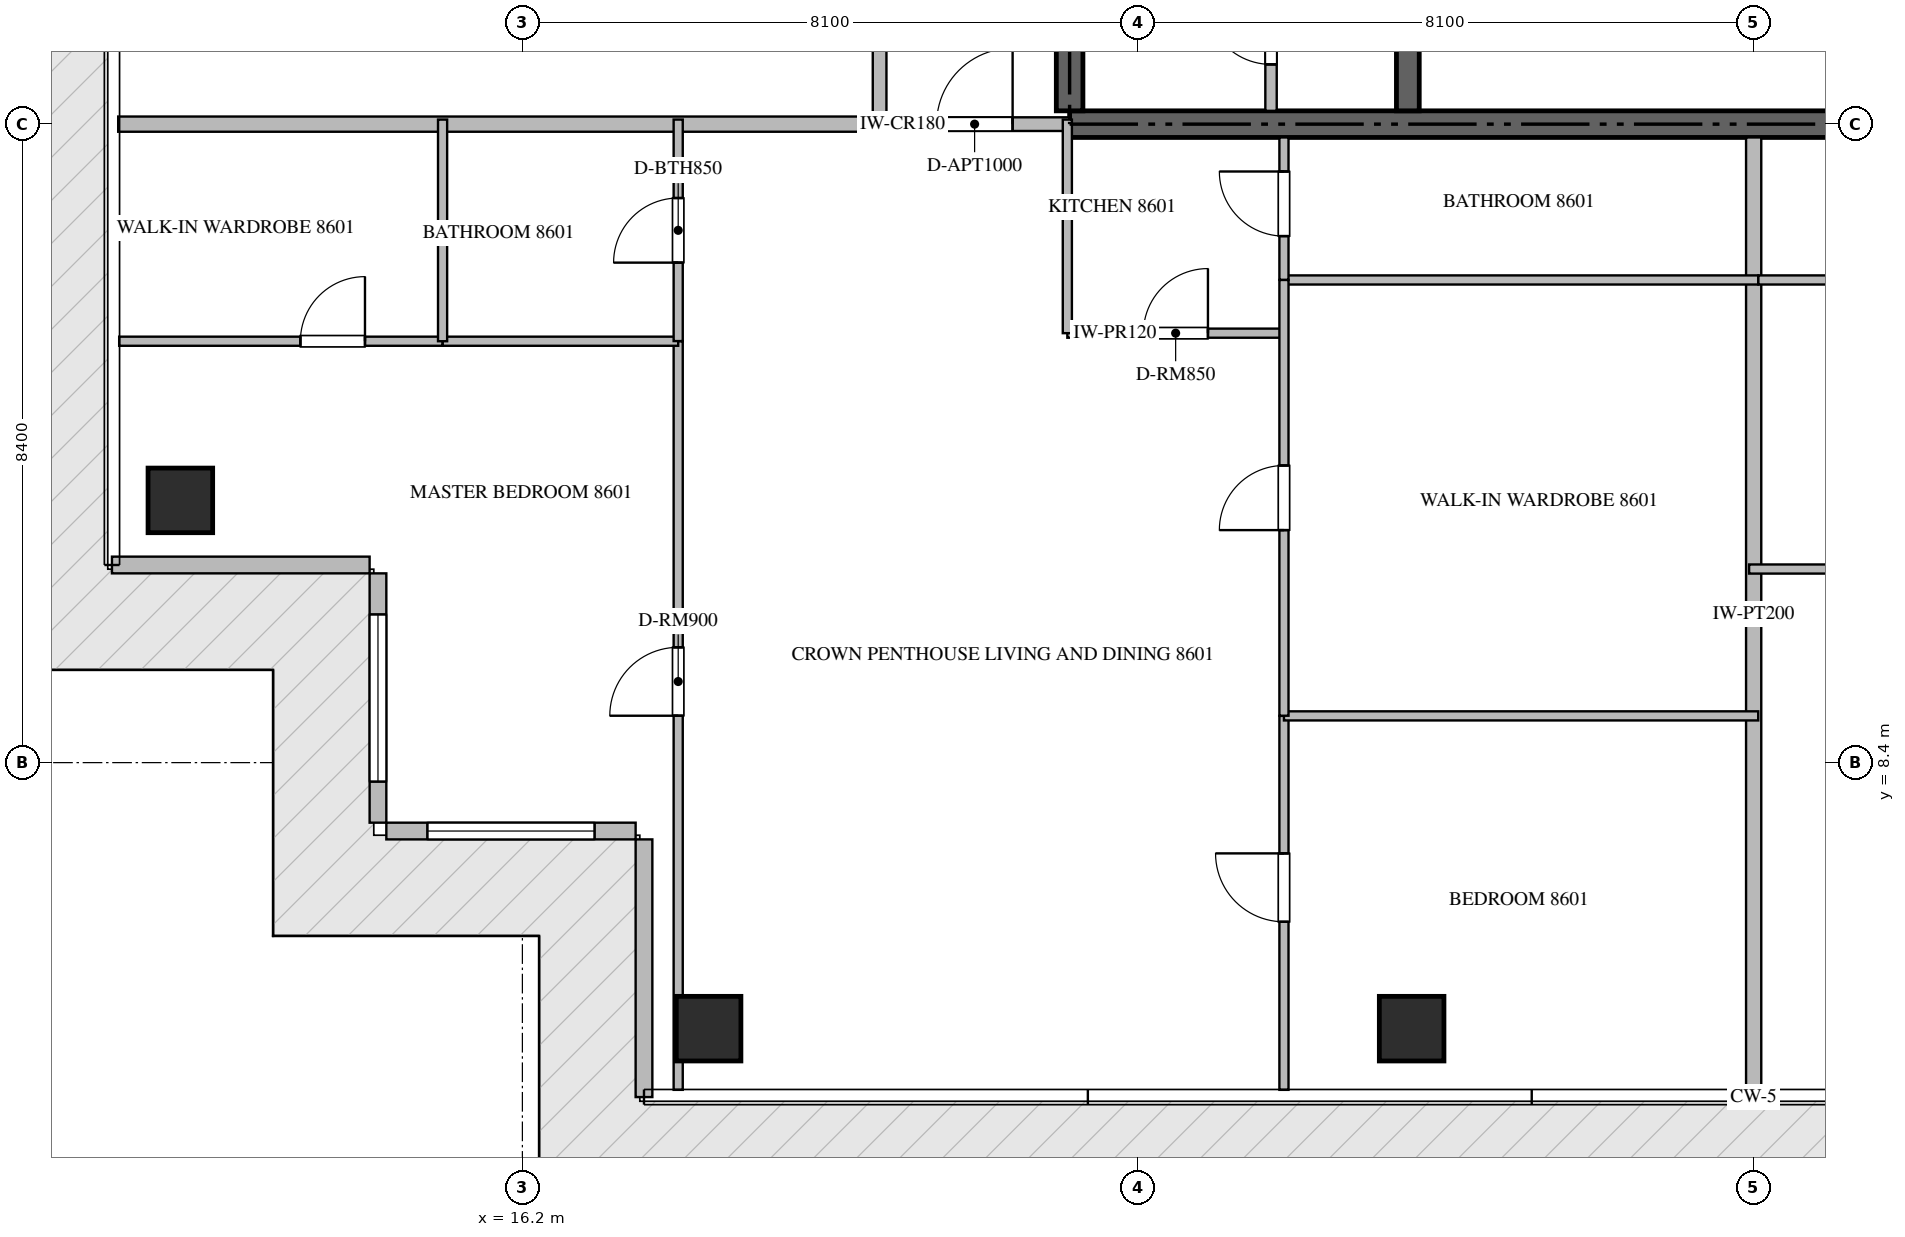
"""IFC4 building model, lengths in metres.
Left out: names, types, materials, properties, quantities, classifications, styles, units other than length and angle.
Written with IfcOpenShell. Run it as: python <this file> out.ifc"""

import sys

from ifc_helpers import new_model, si_unit, direction, frame, frame_2d, origin, origin_2d, place, context, subcontext, project, spatial, rectangle, extrude, source, transform, mapped, element, fill, save


model = new_model("IFC4")
c1 = context("Model", 3, precision=1e-05, world=origin(), true_north=direction((0.0, 1.0)))
c2 = subcontext(c1, "Body", "Model", "MODEL_VIEW")
j1 = project(units=[si_unit("LENGTHUNIT", "METRE"), si_unit("PLANEANGLEUNIT", "RADIAN")], contexts=[c1])
p1 = place(None, origin())
s1 = spatial("IfcSite", under=j1, at=p1, CompositionType="ELEMENT")
p2 = place(p1, origin())
s2 = spatial("IfcBuilding", under=s1, at=p2, CompositionType="ELEMENT")
p3 = place(p2, frame((0.0, 0.0, 347.95)))
s3 = spatial("IfcBuildingStorey", under=s2, at=p3, CompositionType="ELEMENT", Elevation=347.95)
p4 = place(p3, frame((23.4, 16.8, -0.26), z_axis=(0.0, 0.0, 1.0), x_axis=(1.0, 0.0, 0.0)))
e1 = element("IfcWall", 1, at=p4, inside=s3, PredefinedType="SHEAR", context=c2, shape_type="SweptSolid", body=[
    extrude(rectangle(XDim=18.0, YDim=0.35, at=frame_2d((9.0, 0.0))), origin(), (0.0, 0.0, 1.0), 5.898),
])
p5 = place(p3, frame((23.4, 16.975, -0.26), z_axis=(0.0, 0.0, 1.0), x_axis=(0.0, 1.0, 0.0)))
e2 = element("IfcWall", 2, at=p5, inside=s3, PredefinedType="SHEAR", context=c2, shape_type="SweptSolid", body=[
    extrude(rectangle(XDim=4.875, YDim=0.35, at=frame_2d((2.438, 0.0))), origin(), (0.0, 0.0, 1.0), 5.898),
])
p6 = place(p3, frame((27.85, 16.975, -0.26), z_axis=(0.0, 0.0, 1.0), x_axis=(0.0, 1.0, 0.0)))
e3 = element("IfcWall", 3, at=p6, inside=s3, PredefinedType="SHEAR", context=c2, shape_type="SweptSolid", body=[
    extrude(rectangle(XDim=4.875, YDim=0.3, at=frame_2d((2.438, 0.0))), origin(), (0.0, 0.0, 1.0), 5.898),
])
m1 = source(origin(), c2, "Body", "SweptSolid", [
    extrude(rectangle(XDim=0.85, YDim=0.85, at=origin_2d()), origin(), (0.0, 0.0, 1.0), 5.9),
])
for number, where, z_axis, x_axis in (
    (4, (18.65, 4.9, -0.26), (0.0, 0.0, 1.0), (1.0, 0.0, 0.0)),
    (5, (27.9, 4.9, -0.26), (0.0, 0.0, 1.0), (1.0, 0.0, 0.0)),
    (6, (11.7, 11.85, -0.26), (0.0, 0.0, 1.0), (1.0, 0.0, 0.0)),
):
    element("IfcColumn", number, at=place(p3, frame(where, z_axis=z_axis, x_axis=x_axis)), inside=s3, PredefinedType="COLUMN", context=c2, shape_type="MappedRepresentation", body=[
        mapped(m1, transform((0.0, 0.0, 0.0), scale=1.0)),
    ])
p7 = place(p3, frame((10.8, 11.0, 0.0), z_axis=(0.0, 0.0, 1.0), x_axis=(1.0, 0.0, 0.0)))
e7 = element("IfcWall", 7, at=p7, inside=s3, PredefinedType="ELEMENTEDWALL", context=c2, shape_type="SweptSolid", body=[
    extrude(rectangle(XDim=3.39, YDim=0.22, at=frame_2d((1.695, 0.0))), origin(), (0.0, 0.0, 1.0), 5.625),
])
p8 = place(p3, frame((14.3, 10.89, 0.0), z_axis=(0.0, 0.0, 1.0), x_axis=(0.0, -1.0, 0.0)))
e8 = element("IfcWall", 8, at=p8, inside=s3, PredefinedType="ELEMENTEDWALL", context=c2, shape_type="SweptSolid", body=[
    extrude(rectangle(XDim=3.28, YDim=0.22, at=frame_2d((1.64, 0.0))), origin(), (0.0, 0.0, 1.0), 5.625),
])
p9 = place(p8, frame((0.54, 0.0, 0.65)))
e9 = element("IfcOpeningElement", 9, at=p9, cuts=e8, PredefinedType="OPENING", context=c2, shape_type="SweptSolid", body=[
    extrude(rectangle(XDim=2.2, YDim=2.4, at=frame_2d((1.1, 1.2))), frame((0.0, 0.12, 0.0), z_axis=(0.0, -1.0, 0.0), x_axis=(1.0, 0.0, 0.0)), (0.0, 0.0, 1.0), 0.24),
])
p10 = place(p3, frame((14.41, 7.5, 0.0), z_axis=(0.0, 0.0, 1.0), x_axis=(1.0, 0.0, 0.0)))
e10 = element("IfcWall", 10, at=p10, inside=s3, PredefinedType="ELEMENTEDWALL", context=c2, shape_type="SweptSolid", body=[
    extrude(rectangle(XDim=3.28, YDim=0.22, at=frame_2d((1.64, 0.0))), origin(), (0.0, 0.0, 1.0), 5.625),
])
p11 = place(p10, frame((0.54, 0.0, 0.65)))
e11 = element("IfcOpeningElement", 11, at=p11, cuts=e10, PredefinedType="OPENING", context=c2, shape_type="SweptSolid", body=[
    extrude(rectangle(XDim=2.2, YDim=2.4, at=frame_2d((1.1, 1.2))), frame((0.0, 0.12, 0.0), z_axis=(0.0, -1.0, 0.0), x_axis=(1.0, 0.0, 0.0)), (0.0, 0.0, 1.0), 0.24),
])
p12 = place(p3, frame((17.8, 7.39, 0.0), z_axis=(0.0, 0.0, 1.0), x_axis=(0.0, -1.0, 0.0)))
e12 = element("IfcWall", 12, at=p12, inside=s3, PredefinedType="ELEMENTEDWALL", context=c2, shape_type="SweptSolid", body=[
    extrude(rectangle(XDim=3.39, YDim=0.22, at=frame_2d((1.695, 0.0))), origin(), (0.0, 0.0, 1.0), 5.625),
])
p13 = place(p3, frame((26.05, 16.975, 0.0), z_axis=(0.0, 0.0, 1.0), x_axis=(0.0, 1.0, 0.0)))
e13 = element("IfcWall", 13, at=p13, inside=s3, PredefinedType="PARTITIONING", context=c2, shape_type="SweptSolid", body=[
    extrude(rectangle(XDim=2.073, YDim=0.15, at=frame_2d((1.037, 0.0))), origin(), (0.0, 0.0, 1.0), 5.64),
])
p14 = place(p13, frame((0.611, 0.0, 0.0)))
e14 = element("IfcOpeningElement", 14, at=p14, cuts=e13, PredefinedType="OPENING", context=c2, shape_type="SweptSolid", body=[
    extrude(rectangle(XDim=0.85, YDim=2.1, at=frame_2d((0.425, 1.05))), frame((0.0, 0.085, 0.0), z_axis=(0.0, -1.0, 0.0), x_axis=(1.0, 0.0, 0.0)), (0.0, 0.0, 1.0), 0.17),
])
p15 = place(p3, frame((32.4, 4.082, 0.0), z_axis=(0.0, 0.0, 1.0), x_axis=(0.0, 1.0, 0.0)))
e15 = element("IfcWall", 15, at=p15, inside=s3, PredefinedType="PARTITIONING", context=c2, shape_type="SweptSolid", body=[
    extrude(rectangle(XDim=12.543, YDim=0.2, at=frame_2d((6.271, 0.0))), origin(), (0.0, 0.0, 1.0), 5.64),
])
p16 = place(p3, frame((10.882, 16.8, 0.0), z_axis=(0.0, 0.0, 1.0), x_axis=(1.0, 0.0, 0.0)))
e16 = element("IfcWall", 16, at=p16, inside=s3, PredefinedType="PARTITIONING", context=c2, shape_type="SweptSolid", body=[
    extrude(rectangle(XDim=10.018, YDim=0.2, at=frame_2d((5.009, 0.0))), origin(), (0.0, 0.0, 1.0), 5.64),
])
p17 = place(p3, frame((20.902, 16.8, 0.0), z_axis=(0.0, 0.0, 1.0), x_axis=(1.0, 0.0, 0.0)))
e17 = element("IfcWall", 17, at=p17, inside=s3, PredefinedType="PARTITIONING", context=c2, shape_type="SweptSolid", body=[
    extrude(rectangle(XDim=2.496, YDim=0.18, at=frame_2d((1.248, 0.0))), origin(), (0.0, 0.0, 1.0), 5.64),
])
p18 = place(p17, frame((0.748, 0.0, 0.0)))
e18 = element("IfcOpeningElement", 18, at=p18, cuts=e17, PredefinedType="OPENING", context=c2, shape_type="SweptSolid", body=[
    extrude(rectangle(XDim=1.0, YDim=2.15, at=frame_2d((0.5, 1.075))), frame((0.0, 0.1, 0.0), z_axis=(0.0, -1.0, 0.0), x_axis=(1.0, 0.0, 0.0)), (0.0, 0.0, 1.0), 0.2),
])
p19 = place(p3, frame((20.9, 16.8, 0.0), z_axis=(0.0, 0.0, 1.0), x_axis=(0.0, 1.0, 0.0)))
e19 = element("IfcWall", 19, at=p19, inside=s3, PredefinedType="PARTITIONING", context=c2, shape_type="SweptSolid", body=[
    extrude(rectangle(XDim=16.8, YDim=0.18, at=frame_2d((8.4, 0.0))), origin(), (0.0, 0.0, 1.0), 5.64),
])
p20 = place(p19, frame((1.3, 0.0, 0.0)))
e20 = element("IfcOpeningElement", 20, at=p20, cuts=e19, PredefinedType="OPENING", context=c2, shape_type="SweptSolid", body=[
    extrude(rectangle(XDim=1.0, YDim=2.15, at=frame_2d((0.5, 1.075))), frame((0.0, 0.1, 0.0), z_axis=(0.0, -1.0, 0.0), x_axis=(1.0, 0.0, 0.0)), (0.0, 0.0, 1.0), 0.2),
])
p21 = place(p3, frame((23.37, 14.05, 0.0), z_axis=(0.0, 0.0, 1.0), x_axis=(1.0, 0.0, 0.0)))
e21 = element("IfcWall", 21, at=p21, inside=s3, PredefinedType="PARTITIONING", context=c2, shape_type="SweptSolid", body=[
    extrude(rectangle(XDim=2.85, YDim=0.12, at=frame_2d((1.425, 0.0))), origin(), (0.0, 0.0, 1.0), 5.64),
])
p22 = place(p21, frame((1.0, 0.0, 0.0)))
e22 = element("IfcOpeningElement", 22, at=p22, cuts=e21, PredefinedType="OPENING", context=c2, shape_type="SweptSolid", body=[
    extrude(rectangle(XDim=0.85, YDim=2.1, at=frame_2d((0.425, 1.05))), frame((0.0, 0.07, 0.0), z_axis=(0.0, -1.0, 0.0), x_axis=(1.0, 0.0, 0.0)), (0.0, 0.0, 1.0), 0.14),
])
p23 = place(p3, frame((23.37, 14.05, 0.0), z_axis=(0.0, 0.0, 1.0), x_axis=(0.0, 1.0, 0.0)))
e23 = element("IfcWall", 23, at=p23, inside=s3, PredefinedType="PARTITIONING", context=c2, shape_type="SweptSolid", body=[
    extrude(rectangle(XDim=2.81, YDim=0.12, at=frame_2d((1.405, 0.0))), origin(), (0.0, 0.0, 1.0), 5.64),
])
p24 = place(p3, frame((18.25, 4.095, 0.0), z_axis=(0.0, 0.0, 1.0), x_axis=(0.0, 1.0, 0.0)))
e24 = element("IfcWall", 24, at=p24, inside=s3, PredefinedType="PARTITIONING", context=c2, shape_type="SweptSolid", body=[
    extrude(rectangle(XDim=9.849, YDim=0.12, at=frame_2d((4.925, 0.0))), origin(), (0.0, 0.0, 1.0), 5.64),
])
p25 = place(p24, frame((4.922, 0.0, 0.0)))
e25 = element("IfcOpeningElement", 25, at=p25, cuts=e24, PredefinedType="OPENING", context=c2, shape_type="SweptSolid", body=[
    extrude(rectangle(XDim=0.9, YDim=2.1, at=frame_2d((0.45, 1.05))), frame((0.0, 0.07, 0.0), z_axis=(0.0, -1.0, 0.0), x_axis=(1.0, 0.0, 0.0)), (0.0, 0.0, 1.0), 0.14),
])
p26 = place(p3, frame((10.895, 13.944, 0.0), z_axis=(0.0, 0.0, 1.0), x_axis=(1.0, 0.0, 0.0)))
e26 = element("IfcWall", 26, at=p26, inside=s3, PredefinedType="PARTITIONING", context=c2, shape_type="SweptSolid", body=[
    extrude(rectangle(XDim=4.255, YDim=0.12, at=frame_2d((2.127, 0.0))), origin(), (0.0, 0.0, 1.0), 5.64),
])
p27 = place(p26, frame((2.384, 0.0, 0.0)))
e27 = element("IfcOpeningElement", 27, at=p27, cuts=e26, PredefinedType="OPENING", context=c2, shape_type="SweptSolid", body=[
    extrude(rectangle(XDim=0.85, YDim=2.1, at=frame_2d((0.425, 1.05))), frame((0.0, 0.07, 0.0), z_axis=(0.0, -1.0, 0.0), x_axis=(1.0, 0.0, 0.0)), (0.0, 0.0, 1.0), 0.14),
])
p28 = place(p3, frame((15.152, 13.944, 0.0), z_axis=(0.0, 0.0, 1.0), x_axis=(1.0, 0.0, 0.0)))
e28 = element("IfcWall", 28, at=p28, inside=s3, PredefinedType="PARTITIONING", context=c2, shape_type="SweptSolid", body=[
    extrude(rectangle(XDim=3.098, YDim=0.12, at=frame_2d((1.549, 0.0))), origin(), (0.0, 0.0, 1.0), 5.64),
])
p29 = place(p3, frame((15.15, 13.944, 0.0), z_axis=(0.0, 0.0, 1.0), x_axis=(0.0, 1.0, 0.0)))
e29 = element("IfcWall", 29, at=p29, inside=s3, PredefinedType="PARTITIONING", context=c2, shape_type="SweptSolid", body=[
    extrude(rectangle(XDim=2.916, YDim=0.12, at=frame_2d((1.458, 0.0))), origin(), (0.0, 0.0, 1.0), 5.64),
])
p30 = place(p3, frame((18.25, 13.946, 0.0), z_axis=(0.0, 0.0, 1.0), x_axis=(0.0, 1.0, 0.0)))
e30 = element("IfcWall", 30, at=p30, inside=s3, PredefinedType="PARTITIONING", context=c2, shape_type="SweptSolid", body=[
    extrude(rectangle(XDim=2.914, YDim=0.12, at=frame_2d((1.457, 0.0))), origin(), (0.0, 0.0, 1.0), 5.64),
])
p31 = place(p30, frame((1.032, 0.0, 0.0)))
e31 = element("IfcOpeningElement", 31, at=p31, cuts=e30, PredefinedType="OPENING", context=c2, shape_type="SweptSolid", body=[
    extrude(rectangle(XDim=0.85, YDim=2.1, at=frame_2d((0.425, 1.05))), frame((0.0, 0.07, 0.0), z_axis=(0.0, -1.0, 0.0), x_axis=(1.0, 0.0, 0.0)), (0.0, 0.0, 1.0), 0.14),
])
p32 = place(p3, frame((26.22, 4.095, 0.0), z_axis=(0.0, 0.0, 1.0), x_axis=(0.0, 1.0, 0.0)))
e32 = element("IfcWall", 32, at=p32, inside=s3, PredefinedType="PARTITIONING", context=c2, shape_type="SweptSolid", body=[
    extrude(rectangle(XDim=4.92, YDim=0.12, at=frame_2d((2.46, 0.0))), origin(), (0.0, 0.0, 1.0), 5.64),
])
p33 = place(p32, frame((2.211, 0.0, 0.0)))
e33 = element("IfcOpeningElement", 33, at=p33, cuts=e32, PredefinedType="OPENING", context=c2, shape_type="SweptSolid", body=[
    extrude(rectangle(XDim=0.9, YDim=2.1, at=frame_2d((0.45, 1.05))), frame((0.0, 0.07, 0.0), z_axis=(0.0, -1.0, 0.0), x_axis=(1.0, 0.0, 0.0)), (0.0, 0.0, 1.0), 0.14),
])
for number, where, z_axis, x_axis in (
    (34, (26.22, 9.015, 0.0), (0.0, 0.0, 1.0), (1.0, 0.0, 0.0)),
    (35, (26.22, 14.75, 0.0), (0.0, 0.0, 1.0), (1.0, 0.0, 0.0)),
):
    element("IfcWall", number, at=place(p3, frame(where, z_axis=z_axis, x_axis=x_axis)), inside=s3, PredefinedType="PARTITIONING", context=c2, shape_type="SweptSolid", body=[
        extrude(rectangle(XDim=6.24, YDim=0.12, at=frame_2d((3.12, 0.0))), origin(), (0.0, 0.0, 1.0), 5.64),
    ])
p34 = place(p3, frame((26.22, 9.017, 0.0), z_axis=(0.0, 0.0, 1.0), x_axis=(0.0, 1.0, 0.0)))
e36 = element("IfcWall", 36, at=p34, inside=s3, PredefinedType="PARTITIONING", context=c2, shape_type="SweptSolid", body=[
    extrude(rectangle(XDim=5.733, YDim=0.12, at=frame_2d((2.866, 0.0))), origin(), (0.0, 0.0, 1.0), 5.64),
])
p35 = place(p34, frame((2.442, 0.0, 0.0)))
e37 = element("IfcOpeningElement", 37, at=p35, cuts=e36, PredefinedType="OPENING", context=c2, shape_type="SweptSolid", body=[
    extrude(rectangle(XDim=0.85, YDim=2.1, at=frame_2d((0.425, 1.05))), frame((0.0, 0.07, 0.0), z_axis=(0.0, -1.0, 0.0), x_axis=(1.0, 0.0, 0.0)), (0.0, 0.0, 1.0), 0.14),
])
p36 = place(p3, frame((26.22, 14.752, 0.0), z_axis=(0.0, 0.0, 1.0), x_axis=(0.0, 1.0, 0.0)))
e38 = element("IfcWall", 38, at=p36, inside=s3, PredefinedType="PARTITIONING", context=c2, shape_type="SweptSolid", body=[
    extrude(rectangle(XDim=1.873, YDim=0.12, at=frame_2d((0.937, 0.0))), origin(), (0.0, 0.0, 1.0), 5.64),
])
p37 = place(p36, frame((0.575, 0.0, 0.0)))
e39 = element("IfcOpeningElement", 39, at=p37, cuts=e38, PredefinedType="OPENING", context=c2, shape_type="SweptSolid", body=[
    extrude(rectangle(XDim=0.85, YDim=2.1, at=frame_2d((0.425, 1.05))), frame((0.0, 0.07, 0.0), z_axis=(0.0, -1.0, 0.0), x_axis=(1.0, 0.0, 0.0)), (0.0, 0.0, 1.0), 0.14),
])
p38 = place(p3, frame((32.34, 10.947, 0.0), z_axis=(0.0, 0.0, 1.0), x_axis=(1.0, 0.0, 0.0)))
e40 = element("IfcWall", 40, at=p38, inside=s3, PredefinedType="PARTITIONING", context=c2, shape_type="SweptSolid", body=[
    extrude(rectangle(XDim=6.24, YDim=0.12, at=frame_2d((3.12, 0.0))), origin(), (0.0, 0.0, 1.0), 5.64),
])
p39 = place(p3, frame((32.462, 14.75, 0.0), z_axis=(0.0, 0.0, 1.0), x_axis=(1.0, 0.0, 0.0)))
e41 = element("IfcWall", 41, at=p39, inside=s3, PredefinedType="PARTITIONING", context=c2, shape_type="SweptSolid", body=[
    extrude(rectangle(XDim=6.118, YDim=0.12, at=frame_2d((3.059, 0.0))), origin(), (0.0, 0.0, 1.0), 5.64),
])
m2 = source(origin(), c2, "Body", "SweptSolid", [
    extrude(rectangle(XDim=2.2, YDim=2.4, at=frame_2d((1.1, 1.2))), frame((0.0, 0.03, 0.0), z_axis=(0.0, -1.0, 0.0), x_axis=(1.0, 0.0, 0.0)), (0.0, 0.0, 1.0), 0.06),
])
p40 = place(p9, origin())
e42 = element("IfcWindow", 42, at=p40, inside=s3, PartitioningType="SINGLE_PANEL", PredefinedType="WINDOW", context=c2, shape_type="MappedRepresentation", body=[
    mapped(m2, transform((0.0, 0.0, 0.0), scale=1.0)),
])
fill(e9, e42)
p41 = place(p11, origin())
e43 = element("IfcWindow", 43, at=p41, inside=s3, PartitioningType="SINGLE_PANEL", PredefinedType="WINDOW", context=c2, shape_type="MappedRepresentation", body=[
    mapped(m2, transform((0.0, 0.0, 0.0), scale=1.0)),
])
fill(e11, e43)
m3 = source(origin(), c2, "Body", "SweptSolid", [
    extrude(rectangle(XDim=0.85, YDim=2.1, at=frame_2d((0.425, 1.05))), frame((0.0, 0.025, 0.0), z_axis=(0.0, -1.0, 0.0), x_axis=(1.0, 0.0, 0.0)), (0.0, 0.0, 1.0), 0.05),
])
p42 = place(p14, origin())
e44 = element("IfcDoor", 44, at=p42, inside=s3, OperationType="SINGLE_SWING_RIGHT", PredefinedType="DOOR", context=c2, shape_type="MappedRepresentation", body=[
    mapped(m3, transform((0.0, 0.0, 0.0), scale=1.0)),
])
fill(e14, e44)
m4 = source(origin(), c2, "Body", "SweptSolid", [
    extrude(rectangle(XDim=1.0, YDim=2.15, at=frame_2d((0.5, 1.075))), frame((0.0, 0.025, 0.0), z_axis=(0.0, -1.0, 0.0), x_axis=(1.0, 0.0, 0.0)), (0.0, 0.0, 1.0), 0.05),
])
p43 = place(p18, origin())
e45 = element("IfcDoor", 45, at=p43, inside=s3, OperationType="SINGLE_SWING_RIGHT", PredefinedType="DOOR", context=c2, shape_type="MappedRepresentation", body=[
    mapped(m4, transform((0.0, 0.0, 0.0), scale=1.0)),
])
fill(e18, e45)
p44 = place(p22, origin())
e46 = element("IfcDoor", 46, at=p44, inside=s3, OperationType="SINGLE_SWING_RIGHT", PredefinedType="DOOR", context=c2, shape_type="MappedRepresentation", body=[
    mapped(m3, transform((0.0, 0.0, 0.0), scale=1.0)),
])
fill(e22, e46)
m5 = source(origin(), c2, "Body", "SweptSolid", [
    extrude(rectangle(XDim=0.9, YDim=2.1, at=frame_2d((0.45, 1.05))), frame((0.0, 0.025, 0.0), z_axis=(0.0, -1.0, 0.0), x_axis=(1.0, 0.0, 0.0)), (0.0, 0.0, 1.0), 0.05),
])
p45 = place(p25, origin())
e47 = element("IfcDoor", 47, at=p45, inside=s3, OperationType="SINGLE_SWING_LEFT", PredefinedType="DOOR", context=c2, shape_type="MappedRepresentation", body=[
    mapped(m5, transform((0.0, 0.0, 0.0), scale=1.0)),
])
fill(e25, e47)
p46 = place(p27, origin())
e48 = element("IfcDoor", 48, at=p46, inside=s3, OperationType="SINGLE_SWING_RIGHT", PredefinedType="DOOR", context=c2, shape_type="MappedRepresentation", body=[
    mapped(m3, transform((0.0, 0.0, 0.0), scale=1.0)),
])
fill(e27, e48)
p47 = place(p31, origin())
e49 = element("IfcDoor", 49, at=p47, inside=s3, OperationType="SINGLE_SWING_LEFT", PredefinedType="DOOR", context=c2, shape_type="MappedRepresentation", body=[
    mapped(m3, transform((0.0, 0.0, 0.0), scale=1.0)),
])
fill(e31, e49)
p48 = place(p33, origin())
e50 = element("IfcDoor", 50, at=p48, inside=s3, OperationType="SINGLE_SWING_RIGHT", PredefinedType="DOOR", context=c2, shape_type="MappedRepresentation", body=[
    mapped(m5, transform((0.0, 0.0, 0.0), scale=1.0)),
])
fill(e33, e50)
p49 = place(p35, origin())
e51 = element("IfcDoor", 51, at=p49, inside=s3, OperationType="SINGLE_SWING_LEFT", PredefinedType="DOOR", context=c2, shape_type="MappedRepresentation", body=[
    mapped(m3, transform((0.0, 0.0, 0.0), scale=1.0)),
])
fill(e37, e51)
p50 = place(p37, origin())
e52 = element("IfcDoor", 52, at=p50, inside=s3, OperationType="SINGLE_SWING_RIGHT", PredefinedType="DOOR", context=c2, shape_type="MappedRepresentation", body=[
    mapped(m3, transform((0.0, 0.0, 0.0), scale=1.0)),
])
fill(e39, e52)
save(model, sys.argv[1])
